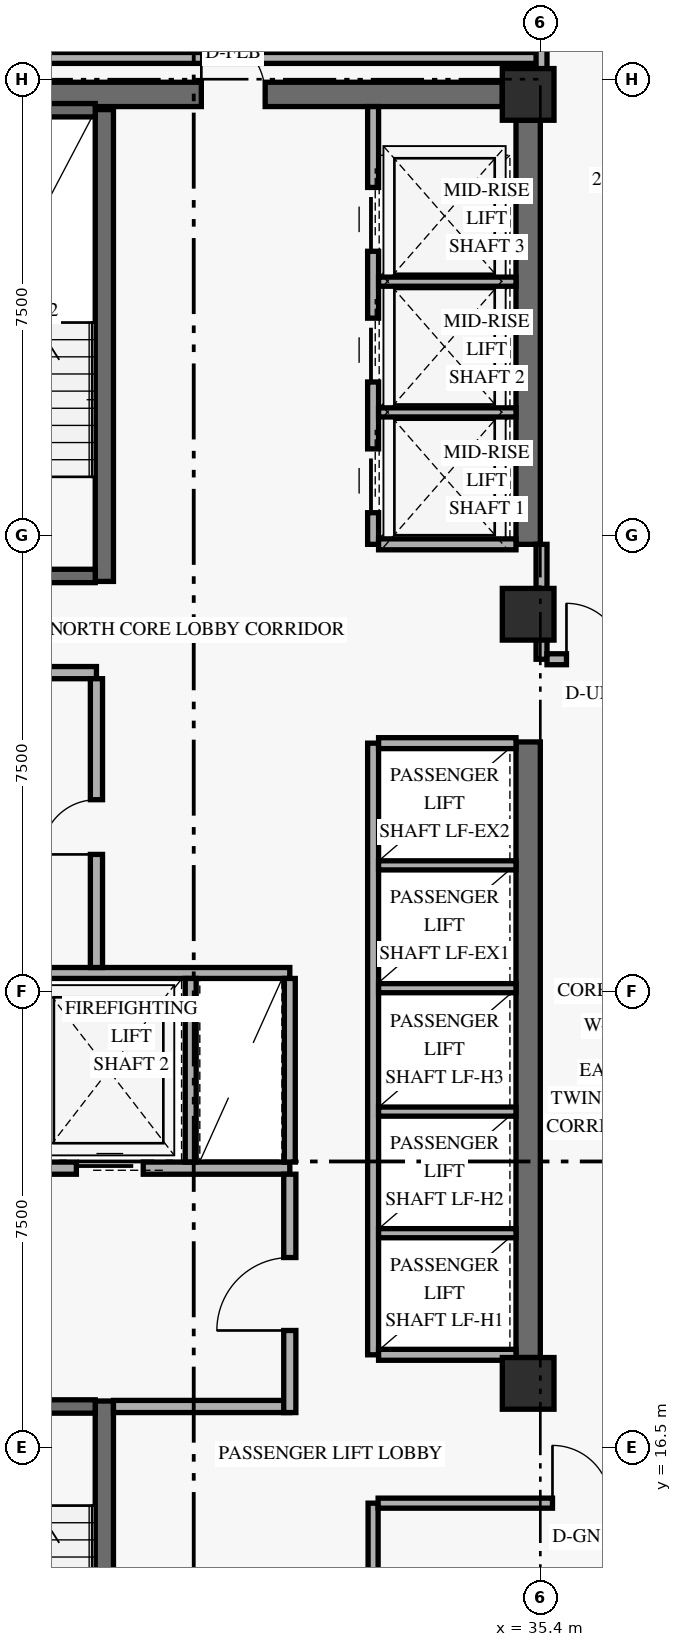
"""IFC4 building model, lengths in metres.
Left out: names, types, materials, properties, quantities, classifications, styles, units other than length and angle.
Written with IfcOpenShell. Run it as: python <this file> out.ifc"""

import sys

from ifc_helpers import new_model, si_unit, direction, frame, frame_2d, origin, origin_2d, place, context, subcontext, project, spatial, rectangle, extrude, element, fill, save


model = new_model("IFC4")
c1 = context("Model", 3, precision=1e-05, world=origin(), true_north=direction((0.0, 1.0)))
c2 = subcontext(c1, "Body", "Model", "MODEL_VIEW")
j1 = project(units=[si_unit("LENGTHUNIT", "METRE"), si_unit("PLANEANGLEUNIT", "RADIAN")], contexts=[c1])
p1 = place(None, origin())
s1 = spatial("IfcSite", under=j1, at=p1, CompositionType="ELEMENT")
p2 = place(p1, origin())
s2 = spatial("IfcBuilding", under=s1, at=p2, CompositionType="ELEMENT")
p3 = place(p2, frame((0.0, 0.0, 128.4)))
s3 = spatial("IfcBuildingStorey", under=s2, at=p3, CompositionType="ELEMENT", Elevation=128.4)
p4 = place(p3, frame((35.2, 17.975, 0.0), z_axis=(0.0, 0.0, 1.0), x_axis=(0.0, 1.0, 0.0)))
e1 = element("IfcWall", 1, at=p4, inside=s3, PredefinedType="SHEAR", context=c2, shape_type="SweptSolid", body=[
    extrude(rectangle(XDim=10.125, YDim=0.4, at=frame_2d((5.062, 0.0))), origin(), (0.0, 0.0, 1.0), 2.749),
])
p5 = place(p3, frame((35.2, 31.35, 0.0), z_axis=(0.0, 0.0, 1.0), x_axis=(0.0, 1.0, 0.0)))
e2 = element("IfcWall", 2, at=p5, inside=s3, PredefinedType="SHEAR", context=c2, shape_type="SweptSolid", body=[
    extrude(rectangle(XDim=6.975, YDim=0.4, at=frame_2d((3.487, 0.0))), origin(), (0.0, 0.0, 1.0), 2.749),
])
p6 = place(p3, frame((24.625, 38.75, 0.0), z_axis=(0.0, 0.0, 1.0), x_axis=(1.0, 0.0, 0.0)))
e3 = element("IfcWall", 3, at=p6, inside=s3, PredefinedType="SHEAR", context=c2, shape_type="SweptSolid", body=[
    extrude(rectangle(XDim=10.15, YDim=0.4, at=frame_2d((5.075, 0.0))), origin(), (0.0, 0.0, 1.0), 3.36),
])
p7 = place(p6, frame((5.2, 0.0, 0.0)))
e4 = element("IfcOpeningElement", 4, at=p7, cuts=e3, PredefinedType="OPENING", context=c2, shape_type="SweptSolid", body=[
    extrude(rectangle(XDim=1.05, YDim=2.15, at=frame_2d((0.525, 1.075))), frame((0.0, 0.21, 0.0), z_axis=(0.0, -1.0, 0.0), x_axis=(1.0, 0.0, 0.0)), (0.0, 0.0, 1.0), 0.42),
])
p8 = place(p3, frame((28.23, 9.5, 0.0), z_axis=(0.0, 0.0, 1.0), x_axis=(0.0, 1.0, 0.0)))
e5 = element("IfcWall", 5, at=p8, inside=s3, PredefinedType="SHEAR", context=c2, shape_type="SweptSolid", body=[
    extrude(rectangle(XDim=7.76, YDim=0.3, at=frame_2d((3.88, 0.0))), origin(), (0.0, 0.0, 1.0), 3.36),
])
p9 = place(p3, frame((24.92, 17.17, 0.0), z_axis=(0.0, 0.0, 1.0), x_axis=(1.0, 0.0, 0.0)))
e6 = element("IfcWall", 6, at=p9, inside=s3, PredefinedType="SHEAR", context=c2, shape_type="SweptSolid", body=[
    extrude(rectangle(XDim=3.16, YDim=0.22, at=frame_2d((1.58, 0.0))), origin(), (0.0, 0.0, 1.0), 3.36),
])
p10 = place(p9, frame((0.78, 0.0, 0.0)))
e7 = element("IfcOpeningElement", 7, at=p10, cuts=e6, PredefinedType="OPENING", context=c2, shape_type="SweptSolid", body=[
    extrude(rectangle(XDim=1.05, YDim=2.15, at=frame_2d((0.525, 1.075))), frame((0.0, 0.12, 0.0), z_axis=(0.0, -1.0, 0.0), x_axis=(1.0, 0.0, 0.0)), (0.0, 0.0, 1.0), 0.24),
])
p11 = place(p3, frame((28.23, 30.74, 0.0), z_axis=(0.0, 0.0, 1.0), x_axis=(0.0, 1.0, 0.0)))
e8 = element("IfcWall", 8, at=p11, inside=s3, PredefinedType="SHEAR", context=c2, shape_type="SweptSolid", body=[
    extrude(rectangle(XDim=7.76, YDim=0.3, at=frame_2d((3.88, 0.0))), origin(), (0.0, 0.0, 1.0), 3.36),
])
p12 = place(p3, frame((24.92, 30.83, 0.0), z_axis=(0.0, 0.0, 1.0), x_axis=(1.0, 0.0, 0.0)))
e9 = element("IfcWall", 9, at=p12, inside=s3, PredefinedType="SHEAR", context=c2, shape_type="SweptSolid", body=[
    extrude(rectangle(XDim=3.16, YDim=0.22, at=frame_2d((1.58, 0.0))), origin(), (0.0, 0.0, 1.0), 3.36),
])
p13 = place(p12, frame((0.78, 0.0, 0.0)))
e10 = element("IfcOpeningElement", 10, at=p13, cuts=e9, PredefinedType="OPENING", context=c2, shape_type="SweptSolid", body=[
    extrude(rectangle(XDim=1.05, YDim=2.15, at=frame_2d((0.525, 1.075))), frame((0.0, 0.12, 0.0), z_axis=(0.0, -1.0, 0.0), x_axis=(1.0, 0.0, 0.0)), (0.0, 0.0, 1.0), 0.24),
])
p14 = place(p3, frame((24.92, 38.49, 0.0), z_axis=(0.0, 0.0, 1.0), x_axis=(1.0, 0.0, 0.0)))
e11 = element("IfcWall", 11, at=p14, inside=s3, PredefinedType="SHEAR", context=c2, shape_type="SweptSolid", body=[
    extrude(rectangle(XDim=3.16, YDim=0.22, at=frame_2d((1.58, 0.0))), origin(), (0.0, 0.0, 1.0), 3.36),
])
for number, where, z_axis, x_axis in (
    (12, (35.2, 17.55, 0.0), (0.0, 0.0, 1.0), (1.0, 0.0, 0.0)),
    (13, (35.2, 30.2, 0.0), (0.0, 0.0, 1.0), (1.0, 0.0, 0.0)),
    (14, (35.2, 38.75, 0.0), (0.0, 0.0, 1.0), (1.0, 0.0, 0.0)),
):
    element("IfcColumn", number, at=place(p3, frame(where, z_axis=z_axis, x_axis=x_axis)), inside=s3, PredefinedType="COLUMN", context=c2, shape_type="SweptSolid", body=[
        extrude(rectangle(XDim=0.85, YDim=0.85, at=origin_2d()), origin(), (0.0, 0.0, 1.0), 3.6),
    ])
p15 = place(p3, frame((24.45, 21.09, 0.0), z_axis=(0.0, 0.0, 1.0), x_axis=(1.0, 0.0, 0.0)))
e15 = element("IfcWall", 15, at=p15, inside=s3, PredefinedType="STANDARD", context=c2, shape_type="SweptSolid", body=[
    extrude(rectangle(XDim=6.83, YDim=0.2, at=frame_2d((3.415, 0.0))), origin(), (0.0, 0.0, 1.0), 3.36),
])
p16 = place(p15, frame((0.72, 0.0, 0.0)))
e16 = element("IfcOpeningElement", 16, at=p16, cuts=e15, PredefinedType="OPENING", context=c2, shape_type="SweptSolid", body=[
    extrude(rectangle(XDim=1.1, YDim=2.2, at=frame_2d((0.55, 1.1))), frame((0.0, 0.11, 0.0), z_axis=(0.0, -1.0, 0.0), x_axis=(1.0, 0.0, 0.0)), (0.0, 0.0, 1.0), 0.22),
])
p17 = place(p15, frame((3.32, 0.0, 0.0)))
e17 = element("IfcOpeningElement", 17, at=p17, cuts=e15, PredefinedType="OPENING", context=c2, shape_type="SweptSolid", body=[
    extrude(rectangle(XDim=1.1, YDim=2.2, at=frame_2d((0.55, 1.1))), frame((0.0, 0.11, 0.0), z_axis=(0.0, -1.0, 0.0), x_axis=(1.0, 0.0, 0.0)), (0.0, 0.0, 1.0), 0.22),
])
p18 = place(p3, frame((28.38, 17.17, 0.0), z_axis=(0.0, 0.0, 1.0), x_axis=(1.0, 0.0, 0.0)))
e18 = element("IfcWall", 18, at=p18, inside=s3, PredefinedType="STANDARD", context=c2, shape_type="SweptSolid", body=[
    extrude(rectangle(XDim=2.9, YDim=0.2, at=frame_2d((1.45, 0.0))), origin(), (0.0, 0.0, 1.0), 3.36),
])
p19 = place(p3, frame((31.28, 17.07, 0.0), z_axis=(0.0, 0.0, 1.0), x_axis=(0.0, 1.0, 0.0)))
e19 = element("IfcWall", 19, at=p19, inside=s3, PredefinedType="STANDARD", context=c2, shape_type="SweptSolid", body=[
    extrude(rectangle(XDim=3.92, YDim=0.2, at=frame_2d((1.96, 0.0))), origin(), (0.0, 0.0, 1.0), 2.731),
])
p20 = place(p19, frame((1.35, 0.0, 0.0)))
e20 = element("IfcOpeningElement", 20, at=p20, cuts=e19, PredefinedType="OPENING", context=c2, shape_type="SweptSolid", body=[
    extrude(rectangle(XDim=1.2, YDim=2.15, at=frame_2d((0.6, 1.075))), frame((0.0, 0.11, 0.0), z_axis=(0.0, -1.0, 0.0), x_axis=(1.0, 0.0, 0.0)), (0.0, 0.0, 1.0), 0.22),
])
p21 = place(p3, frame((24.45, 24.3, 0.0), z_axis=(0.0, 0.0, 1.0), x_axis=(1.0, 0.0, 0.0)))
e21 = element("IfcWall", 21, at=p21, inside=s3, PredefinedType="STANDARD", context=c2, shape_type="SweptSolid", body=[
    extrude(rectangle(XDim=6.83, YDim=0.18, at=frame_2d((3.415, 0.0))), origin(), (0.0, 0.0, 1.0), 3.36),
])
for number, where, z_axis, x_axis in (
    (22, (29.65, 21.19, 0.0), (0.0, 0.0, 1.0), (0.0, 1.0, 0.0)),
    (23, (31.28, 21.19, 0.0), (0.0, 0.0, 1.0), (0.0, 1.0, 0.0)),
):
    element("IfcWall", number, at=place(p3, frame(where, z_axis=z_axis, x_axis=x_axis)), inside=s3, PredefinedType="STANDARD", context=c2, shape_type="SweptSolid", body=[
        extrude(rectangle(XDim=3.02, YDim=0.18, at=frame_2d((1.51, 0.0))), origin(), (0.0, 0.0, 1.0), 3.36),
    ])
p22 = place(p3, frame((24.45, 29.24, 0.0), z_axis=(0.0, 0.0, 1.0), x_axis=(1.0, 0.0, 0.0)))
e24 = element("IfcWall", 24, at=p22, inside=s3, PredefinedType="STANDARD", context=c2, shape_type="SweptSolid", body=[
    extrude(rectangle(XDim=3.65, YDim=0.2, at=frame_2d((1.825, 0.0))), origin(), (0.0, 0.0, 1.0), 3.36),
])
p23 = place(p3, frame((28.1, 24.39, 0.0), z_axis=(0.0, 0.0, 1.0), x_axis=(0.0, 1.0, 0.0)))
e25 = element("IfcWall", 25, at=p23, inside=s3, PredefinedType="STANDARD", context=c2, shape_type="SweptSolid", body=[
    extrude(rectangle(XDim=4.75, YDim=0.2, at=frame_2d((2.375, 0.0))), origin(), (0.0, 0.0, 1.0), 3.36),
])
p24 = place(p23, frame((1.86, 0.0, 0.0)))
e26 = element("IfcOpeningElement", 26, at=p24, cuts=e25, PredefinedType="OPENING", context=c2, shape_type="SweptSolid", body=[
    extrude(rectangle(XDim=0.9, YDim=2.1, at=frame_2d((0.45, 1.05))), frame((0.0, 0.11, 0.0), z_axis=(0.0, -1.0, 0.0), x_axis=(1.0, 0.0, 0.0)), (0.0, 0.0, 1.0), 0.22),
])
p25 = place(p3, frame((32.65, 18.02, 0.0), z_axis=(0.0, 0.0, 1.0), x_axis=(0.0, 1.0, 0.0)))
e27 = element("IfcWall", 27, at=p25, inside=s3, PredefinedType="STANDARD", context=c2, shape_type="SweptSolid", body=[
    extrude(rectangle(XDim=10.06, YDim=0.18, at=frame_2d((5.03, 0.0))), origin(), (0.0, 0.0, 1.0), 3.36),
])
for number, where, z_axis, x_axis in (
    (28, (32.74, 18.02, 0.0), (0.0, 0.0, 1.0), (1.0, 0.0, 0.0)),
    (29, (32.74, 28.08, 0.0), (0.0, 0.0, 1.0), (1.0, 0.0, 0.0)),
):
    element("IfcWall", number, at=place(p3, frame(where, z_axis=z_axis, x_axis=x_axis)), inside=s3, PredefinedType="STANDARD", context=c2, shape_type="SweptSolid", body=[
        extrude(rectangle(XDim=2.26, YDim=0.18, at=frame_2d((1.13, 0.0))), origin(), (0.0, 0.0, 1.0), 3.36),
    ])
for number, where, z_axis, x_axis in (
    (30, (32.74, 20.02, 0.0), (0.0, 0.0, 1.0), (1.0, 0.0, 0.0)),
    (31, (32.74, 22.02, 0.0), (0.0, 0.0, 1.0), (1.0, 0.0, 0.0)),
    (32, (32.74, 24.05, 0.0), (0.0, 0.0, 1.0), (1.0, 0.0, 0.0)),
    (33, (32.74, 26.07, 0.0), (0.0, 0.0, 1.0), (1.0, 0.0, 0.0)),
):
    element("IfcWall", number, at=place(p3, frame(where, z_axis=z_axis, x_axis=x_axis)), inside=s3, PredefinedType="STANDARD", context=c2, shape_type="SweptSolid", body=[
        extrude(rectangle(XDim=2.26, YDim=0.15, at=frame_2d((1.13, 0.0))), origin(), (0.0, 0.0, 1.0), 3.36),
    ])
p26 = place(p3, frame((32.65, 31.35, 0.0), z_axis=(0.0, 0.0, 1.0), x_axis=(0.0, 1.0, 0.0)))
e34 = element("IfcWall", 34, at=p26, inside=s3, PredefinedType="STANDARD", context=c2, shape_type="SweptSolid", body=[
    extrude(rectangle(XDim=7.2, YDim=0.18, at=frame_2d((3.6, 0.0))), origin(), (0.0, 0.0, 1.0), 3.36),
])
p27 = place(p26, frame((0.52, 0.0, 0.0)))
e35 = element("IfcOpeningElement", 35, at=p27, cuts=e34, PredefinedType="OPENING", context=c2, shape_type="SweptSolid", body=[
    extrude(rectangle(XDim=1.05, YDim=2.2, at=frame_2d((0.525, 1.1))), frame((0.0, 0.1, 0.0), z_axis=(0.0, -1.0, 0.0), x_axis=(1.0, 0.0, 0.0)), (0.0, 0.0, 1.0), 0.2),
])
p28 = place(p26, frame((2.67, 0.0, 0.0)))
e36 = element("IfcOpeningElement", 36, at=p28, cuts=e34, PredefinedType="OPENING", context=c2, shape_type="SweptSolid", body=[
    extrude(rectangle(XDim=1.05, YDim=2.2, at=frame_2d((0.525, 1.1))), frame((0.0, 0.1, 0.0), z_axis=(0.0, -1.0, 0.0), x_axis=(1.0, 0.0, 0.0)), (0.0, 0.0, 1.0), 0.2),
])
p29 = place(p26, frame((4.82, 0.0, 0.0)))
e37 = element("IfcOpeningElement", 37, at=p29, cuts=e34, PredefinedType="OPENING", context=c2, shape_type="SweptSolid", body=[
    extrude(rectangle(XDim=1.05, YDim=2.2, at=frame_2d((0.525, 1.1))), frame((0.0, 0.1, 0.0), z_axis=(0.0, -1.0, 0.0), x_axis=(1.0, 0.0, 0.0)), (0.0, 0.0, 1.0), 0.2),
])
p30 = place(p3, frame((32.74, 31.35, 0.0), z_axis=(0.0, 0.0, 1.0), x_axis=(1.0, 0.0, 0.0)))
e38 = element("IfcWall", 38, at=p30, inside=s3, PredefinedType="STANDARD", context=c2, shape_type="SweptSolid", body=[
    extrude(rectangle(XDim=2.26, YDim=0.18, at=frame_2d((1.13, 0.0))), origin(), (0.0, 0.0, 1.0), 3.36),
])
for number, where, z_axis, x_axis in (
    (39, (32.74, 33.52, 0.0), (0.0, 0.0, 1.0), (1.0, 0.0, 0.0)),
    (40, (32.74, 35.67, 0.0), (0.0, 0.0, 1.0), (1.0, 0.0, 0.0)),
):
    element("IfcWall", number, at=place(p3, frame(where, z_axis=z_axis, x_axis=x_axis)), inside=s3, PredefinedType="STANDARD", context=c2, shape_type="SweptSolid", body=[
        extrude(rectangle(XDim=2.26, YDim=0.15, at=frame_2d((1.13, 0.0))), origin(), (0.0, 0.0, 1.0), 3.36),
    ])
p31 = place(p3, frame((32.65, 9.5, 0.0), z_axis=(0.0, 0.0, 1.0), x_axis=(0.0, 1.0, 0.0)))
e41 = element("IfcWall", 41, at=p31, inside=s3, PredefinedType="PARTITIONING", context=c2, shape_type="SweptSolid", body=[
    extrude(rectangle(XDim=6.08, YDim=0.165, at=frame_2d((3.04, 0.0))), origin(), (0.0, 0.0, 1.0), 3.36),
])
p32 = place(p3, frame((32.732, 15.58, 0.0), z_axis=(0.0, 0.0, 1.0), x_axis=(1.0, 0.0, 0.0)))
e42 = element("IfcWall", 42, at=p32, inside=s3, PredefinedType="PARTITIONING", context=c2, shape_type="SweptSolid", body=[
    extrude(rectangle(XDim=4.818, YDim=0.165, at=frame_2d((2.409, 0.0))), origin(), (0.0, 0.0, 1.0), 2.731),
])
p33 = place(p32, frame((2.867, 0.0, 0.0)))
e43 = element("IfcOpeningElement", 43, at=p33, cuts=e42, PredefinedType="OPENING", context=c2, shape_type="SweptSolid", body=[
    extrude(rectangle(XDim=0.95, YDim=2.15, at=frame_2d((0.475, 1.075))), frame((0.0, 0.093, 0.0), z_axis=(0.0, -1.0, 0.0), x_axis=(1.0, 0.0, 0.0)), (0.0, 0.0, 1.0), 0.185),
])
p34 = place(p3, frame((35.42, 29.46, 0.0), z_axis=(0.0, 0.0, 1.0), x_axis=(0.0, 1.0, 0.0)))
e44 = element("IfcWall", 44, at=p34, inside=s3, PredefinedType="STANDARD", context=c2, shape_type="SweptSolid", body=[
    extrude(rectangle(XDim=1.89, YDim=0.18, at=frame_2d((0.945, 0.0))), origin(), (0.0, 0.0, 1.0), 2.731),
])
p35 = place(p3, frame((35.51, 29.46, 0.0), z_axis=(0.0, 0.0, 1.0), x_axis=(1.0, 0.0, 0.0)))
e45 = element("IfcWall", 45, at=p35, inside=s3, PredefinedType="STANDARD", context=c2, shape_type="SweptSolid", body=[
    extrude(rectangle(XDim=11.69, YDim=0.18, at=frame_2d((5.845, 0.0))), origin(), (0.0, 0.0, 1.0), 2.731),
])
p36 = place(p35, frame((0.32, 0.0, 0.0)))
e46 = element("IfcOpeningElement", 46, at=p36, cuts=e45, PredefinedType="OPENING", context=c2, shape_type="SweptSolid", body=[
    extrude(rectangle(XDim=0.92, YDim=2.15, at=frame_2d((0.46, 1.075))), frame((0.0, 0.1, 0.0), z_axis=(0.0, -1.0, 0.0), x_axis=(1.0, 0.0, 0.0)), (0.0, 0.0, 1.0), 0.2),
])
p37 = place(p3, frame((23.85, 39.35, 0.0), z_axis=(0.0, 0.0, 1.0), x_axis=(1.0, 0.0, 0.0)))
e47 = element("IfcWall", 47, at=p37, inside=s3, PredefinedType="STANDARD", context=c2, shape_type="SweptSolid", body=[
    extrude(rectangle(XDim=11.57, YDim=0.18, at=frame_2d((5.785, 0.0))), origin(), (0.0, 0.0, 1.0), 2.731),
])
p38 = place(p3, frame((35.42, 38.75, 0.0), z_axis=(0.0, 0.0, 1.0), x_axis=(0.0, 1.0, 0.0)))
e48 = element("IfcWall", 48, at=p38, inside=s3, PredefinedType="PARTITIONING", context=c2, shape_type="SweptSolid", body=[
    extrude(rectangle(XDim=6.27, YDim=0.18, at=frame_2d((3.135, 0.0))), origin(), (0.0, 0.0, 1.0), 2.731),
])
p39 = place(p17, origin())
e49 = element("IfcDoor", 49, at=p39, inside=s3, OperationType="SLIDING_TO_LEFT", PredefinedType="DOOR", context=c2, shape_type="SweptSolid", body=[
    extrude(rectangle(XDim=1.1, YDim=2.2, at=frame_2d((0.55, 1.1))), frame((0.0, 0.025, 0.0), z_axis=(0.0, -1.0, 0.0), x_axis=(1.0, 0.0, 0.0)), (0.0, 0.0, 1.0), 0.05),
])
fill(e17, e49)
p40 = place(p20, origin())
e50 = element("IfcDoor", 50, at=p40, inside=s3, OperationType="SINGLE_SWING_LEFT", PredefinedType="DOOR", context=c2, shape_type="SweptSolid", body=[
    extrude(rectangle(XDim=1.2, YDim=2.15, at=frame_2d((0.6, 1.075))), frame((0.0, 0.025, 0.0), z_axis=(0.0, -1.0, 0.0), x_axis=(1.0, 0.0, 0.0)), (0.0, 0.0, 1.0), 0.05),
])
fill(e20, e50)
p41 = place(p24, origin())
e51 = element("IfcDoor", 51, at=p41, inside=s3, OperationType="SINGLE_SWING_LEFT", PredefinedType="DOOR", context=c2, shape_type="SweptSolid", body=[
    extrude(rectangle(XDim=0.9, YDim=2.1, at=frame_2d((0.45, 1.05))), frame((0.0, 0.025, 0.0), z_axis=(0.0, -1.0, 0.0), x_axis=(1.0, 0.0, 0.0)), (0.0, 0.0, 1.0), 0.05),
])
fill(e26, e51)
p42 = place(p27, origin())
e52 = element("IfcDoor", 52, at=p42, inside=s3, OperationType="SLIDING_TO_LEFT", PredefinedType="DOOR", context=c2, shape_type="SweptSolid", body=[
    extrude(rectangle(XDim=1.05, YDim=2.2, at=frame_2d((0.525, 1.1))), frame((0.0, 0.025, 0.0), z_axis=(0.0, -1.0, 0.0), x_axis=(1.0, 0.0, 0.0)), (0.0, 0.0, 1.0), 0.05),
])
fill(e35, e52)
p43 = place(p28, origin())
e53 = element("IfcDoor", 53, at=p43, inside=s3, OperationType="SLIDING_TO_LEFT", PredefinedType="DOOR", context=c2, shape_type="SweptSolid", body=[
    extrude(rectangle(XDim=1.05, YDim=2.2, at=frame_2d((0.525, 1.1))), frame((0.0, 0.025, 0.0), z_axis=(0.0, -1.0, 0.0), x_axis=(1.0, 0.0, 0.0)), (0.0, 0.0, 1.0), 0.05),
])
fill(e36, e53)
p44 = place(p29, origin())
e54 = element("IfcDoor", 54, at=p44, inside=s3, OperationType="SLIDING_TO_LEFT", PredefinedType="DOOR", context=c2, shape_type="SweptSolid", body=[
    extrude(rectangle(XDim=1.05, YDim=2.2, at=frame_2d((0.525, 1.1))), frame((0.0, 0.025, 0.0), z_axis=(0.0, -1.0, 0.0), x_axis=(1.0, 0.0, 0.0)), (0.0, 0.0, 1.0), 0.05),
])
fill(e37, e54)
p45 = place(p33, origin())
e55 = element("IfcDoor", 55, at=p45, inside=s3, OperationType="SINGLE_SWING_LEFT", PredefinedType="DOOR", context=c2, shape_type="SweptSolid", body=[
    extrude(rectangle(XDim=0.95, YDim=2.15, at=frame_2d((0.475, 1.075))), frame((0.0, 0.025, 0.0), z_axis=(0.0, -1.0, 0.0), x_axis=(1.0, 0.0, 0.0)), (0.0, 0.0, 1.0), 0.05),
])
fill(e43, e55)
p46 = place(p7, frame((1.05, 0.0, 0.0), z_axis=(0.0, 0.0, 1.0), x_axis=(-1.0, 0.0, 0.0)))
e56 = element("IfcDoor", 56, at=p46, inside=s3, OperationType="SINGLE_SWING_RIGHT", PredefinedType="DOOR", context=c2, shape_type="SweptSolid", body=[
    extrude(rectangle(XDim=1.05, YDim=2.15, at=frame_2d((0.525, 1.075))), frame((0.0, 0.025, 0.0), z_axis=(0.0, -1.0, 0.0), x_axis=(1.0, 0.0, 0.0)), (0.0, 0.0, 1.0), 0.05),
])
fill(e4, e56)
p47 = place(p36, origin())
e57 = element("IfcDoor", 57, at=p47, inside=s3, OperationType="SINGLE_SWING_LEFT", PredefinedType="DOOR", context=c2, shape_type="SweptSolid", body=[
    extrude(rectangle(XDim=0.92, YDim=2.15, at=frame_2d((0.46, 1.075))), frame((0.0, 0.025, 0.0), z_axis=(0.0, -1.0, 0.0), x_axis=(1.0, 0.0, 0.0)), (0.0, 0.0, 1.0), 0.05),
])
fill(e46, e57)
save(model, sys.argv[1])
